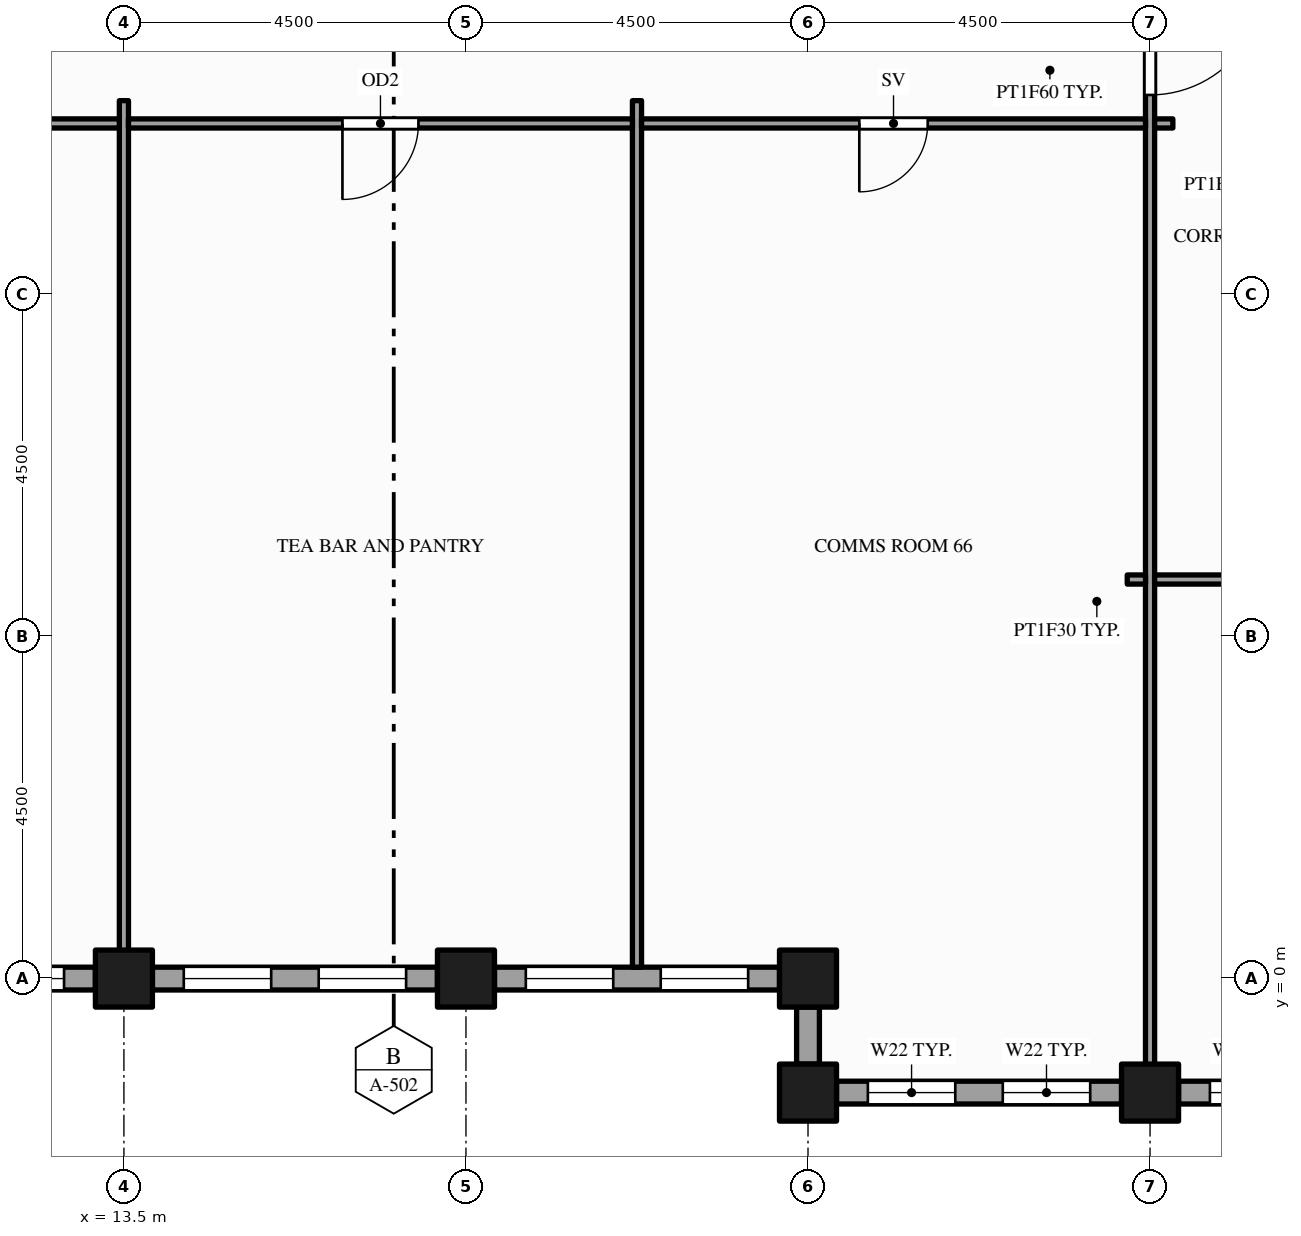
"""IFC4 building model, lengths in metres.
Left out: names, types, materials, properties, quantities, classifications, styles, units other than length and angle.
Written with IfcOpenShell. Run it as: python <this file> out.ifc"""

import sys

from ifc_helpers import new_model, si_unit, direction, frame, frame_2d, origin, origin_2d, place, context, subcontext, project, spatial, rectangle, hollow_rectangle, extrude, element, fill, save


model = new_model("IFC4")
c1 = context("Model", 3, precision=1e-05, world=origin(), true_north=direction((0.0, 1.0)))
c2 = subcontext(c1, "Body", "Model", "MODEL_VIEW")
j1 = project(units=[si_unit("LENGTHUNIT", "METRE"), si_unit("PLANEANGLEUNIT", "RADIAN")], contexts=[c1])
p1 = place(None, origin())
s1 = spatial("IfcSite", under=j1, at=p1, CompositionType="ELEMENT")
p2 = place(p1, origin())
s2 = spatial("IfcBuilding", under=s1, at=p2, CompositionType="ELEMENT")
p3 = place(p2, frame((0.0, 0.0, 207.0)))
s3 = spatial("IfcBuildingStorey", under=s2, at=p3, CompositionType="ELEMENT", Elevation=207.0)
for number, where, z_axis, x_axis in (
    (1, (13.5, 0.0, -0.15), (0.0, 0.0, 1.0), (1.0, 0.0, 0.0)),
    (2, (18.0, 0.0, -0.15), (0.0, 0.0, 1.0), (1.0, 0.0, 0.0)),
    (3, (22.5, -1.5, -0.15), (0.0, 0.0, 1.0), (1.0, 0.0, 0.0)),
    (4, (22.5, 0.0, -0.15), (0.0, 0.0, 1.0), (1.0, 0.0, 0.0)),
    (5, (27.0, -1.5, -0.15), (0.0, 0.0, 1.0), (1.0, 0.0, 0.0)),
):
    element("IfcColumn", number, at=place(p3, frame(where, z_axis=z_axis, x_axis=x_axis)), inside=s3, PredefinedType="COLUMN", context=c2, shape_type="SweptSolid", body=[
        extrude(hollow_rectangle(XDim=0.75, YDim=0.75, WallThickness=0.036, at=origin_2d()), origin(), (0.0, 0.0, 1.0), 4.0),
    ])
p4 = place(p3, frame((22.875, -1.5, 0.0), z_axis=(0.0, 0.0, 1.0), x_axis=(1.0, 0.0, 0.0)))
e6 = element("IfcWall", 6, at=p4, inside=s3, PredefinedType="STANDARD", context=c2, shape_type="SweptSolid", body=[
    extrude(rectangle(XDim=3.75, YDim=0.3, at=frame_2d((1.875, 0.0))), origin(), (0.0, 0.0, 1.0), 2.76),
])
p5 = place(p4, frame((0.413, 0.0, 0.9)))
e7 = element("IfcOpeningElement", 7, at=p5, cuts=e6, PredefinedType="OPENING", context=c2, shape_type="SweptSolid", body=[
    extrude(rectangle(XDim=1.15, YDim=1.5, at=frame_2d((0.575, 0.75))), frame((0.0, 0.16, 0.0), z_axis=(0.0, -1.0, 0.0), x_axis=(1.0, 0.0, 0.0)), (0.0, 0.0, 1.0), 0.32),
])
p6 = place(p4, frame((2.188, 0.0, 0.9)))
e8 = element("IfcOpeningElement", 8, at=p6, cuts=e6, PredefinedType="OPENING", context=c2, shape_type="SweptSolid", body=[
    extrude(rectangle(XDim=1.15, YDim=1.5, at=frame_2d((0.575, 0.75))), frame((0.0, 0.16, 0.0), z_axis=(0.0, -1.0, 0.0), x_axis=(1.0, 0.0, 0.0)), (0.0, 0.0, 1.0), 0.32),
])
p7 = place(p3, frame((27.375, -1.5, 0.0), z_axis=(0.0, 0.0, 1.0), x_axis=(1.0, 0.0, 0.0)))
e9 = element("IfcWall", 9, at=p7, inside=s3, PredefinedType="STANDARD", context=c2, shape_type="SweptSolid", body=[
    extrude(rectangle(XDim=3.75, YDim=0.3, at=frame_2d((1.875, 0.0))), origin(), (0.0, 0.0, 1.0), 2.87),
])
p8 = place(p7, frame((0.413, 0.0, 0.9)))
e10 = element("IfcOpeningElement", 10, at=p8, cuts=e9, PredefinedType="OPENING", context=c2, shape_type="SweptSolid", body=[
    extrude(rectangle(XDim=1.15, YDim=1.75, at=frame_2d((0.575, 0.875))), frame((0.0, 0.16, 0.0), z_axis=(0.0, -1.0, 0.0), x_axis=(1.0, 0.0, 0.0)), (0.0, 0.0, 1.0), 0.32),
])
p9 = place(p7, frame((2.188, 0.0, 0.9)))
e11 = element("IfcOpeningElement", 11, at=p9, cuts=e9, PredefinedType="OPENING", context=c2, shape_type="SweptSolid", body=[
    extrude(rectangle(XDim=1.15, YDim=1.75, at=frame_2d((0.575, 0.875))), frame((0.0, 0.16, 0.0), z_axis=(0.0, -1.0, 0.0), x_axis=(1.0, 0.0, 0.0)), (0.0, 0.0, 1.0), 0.32),
])
p10 = place(p3, frame((9.375, 0.0, 0.0), z_axis=(0.0, 0.0, 1.0), x_axis=(1.0, 0.0, 0.0)))
e12 = element("IfcWall", 12, at=p10, inside=s3, PredefinedType="STANDARD", context=c2, shape_type="SweptSolid", body=[
    extrude(rectangle(XDim=3.75, YDim=0.3, at=frame_2d((1.875, 0.0))), origin(), (0.0, 0.0, 1.0), 2.87),
])
p11 = place(p10, frame((0.413, 0.0, 0.9)))
e13 = element("IfcOpeningElement", 13, at=p11, cuts=e12, PredefinedType="OPENING", context=c2, shape_type="SweptSolid", body=[
    extrude(rectangle(XDim=1.15, YDim=1.75, at=frame_2d((0.575, 0.875))), frame((0.0, 0.16, 0.0), z_axis=(0.0, -1.0, 0.0), x_axis=(1.0, 0.0, 0.0)), (0.0, 0.0, 1.0), 0.32),
])
p12 = place(p10, frame((2.188, 0.0, 0.9)))
e14 = element("IfcOpeningElement", 14, at=p12, cuts=e12, PredefinedType="OPENING", context=c2, shape_type="SweptSolid", body=[
    extrude(rectangle(XDim=1.15, YDim=1.75, at=frame_2d((0.575, 0.875))), frame((0.0, 0.16, 0.0), z_axis=(0.0, -1.0, 0.0), x_axis=(1.0, 0.0, 0.0)), (0.0, 0.0, 1.0), 0.32),
])
p13 = place(p3, frame((13.875, 0.0, 0.0), z_axis=(0.0, 0.0, 1.0), x_axis=(1.0, 0.0, 0.0)))
e15 = element("IfcWall", 15, at=p13, inside=s3, PredefinedType="STANDARD", context=c2, shape_type="SweptSolid", body=[
    extrude(rectangle(XDim=3.75, YDim=0.3, at=frame_2d((1.875, 0.0))), origin(), (0.0, 0.0, 1.0), 2.87),
])
p14 = place(p13, frame((0.413, 0.0, 0.9)))
e16 = element("IfcOpeningElement", 16, at=p14, cuts=e15, PredefinedType="OPENING", context=c2, shape_type="SweptSolid", body=[
    extrude(rectangle(XDim=1.15, YDim=1.75, at=frame_2d((0.575, 0.875))), frame((0.0, 0.16, 0.0), z_axis=(0.0, -1.0, 0.0), x_axis=(1.0, 0.0, 0.0)), (0.0, 0.0, 1.0), 0.32),
])
p15 = place(p13, frame((2.188, 0.0, 0.9)))
e17 = element("IfcOpeningElement", 17, at=p15, cuts=e15, PredefinedType="OPENING", context=c2, shape_type="SweptSolid", body=[
    extrude(rectangle(XDim=1.15, YDim=1.75, at=frame_2d((0.575, 0.875))), frame((0.0, 0.16, 0.0), z_axis=(0.0, -1.0, 0.0), x_axis=(1.0, 0.0, 0.0)), (0.0, 0.0, 1.0), 0.32),
])
p16 = place(p3, frame((18.375, 0.0, 0.0), z_axis=(0.0, 0.0, 1.0), x_axis=(1.0, 0.0, 0.0)))
e18 = element("IfcWall", 18, at=p16, inside=s3, PredefinedType="STANDARD", context=c2, shape_type="SweptSolid", body=[
    extrude(rectangle(XDim=3.75, YDim=0.3, at=frame_2d((1.875, 0.0))), origin(), (0.0, 0.0, 1.0), 2.87),
])
p17 = place(p16, frame((0.413, 0.0, 0.9)))
e19 = element("IfcOpeningElement", 19, at=p17, cuts=e18, PredefinedType="OPENING", context=c2, shape_type="SweptSolid", body=[
    extrude(rectangle(XDim=1.15, YDim=1.75, at=frame_2d((0.575, 0.875))), frame((0.0, 0.16, 0.0), z_axis=(0.0, -1.0, 0.0), x_axis=(1.0, 0.0, 0.0)), (0.0, 0.0, 1.0), 0.32),
])
p18 = place(p16, frame((2.188, 0.0, 0.9)))
e20 = element("IfcOpeningElement", 20, at=p18, cuts=e18, PredefinedType="OPENING", context=c2, shape_type="SweptSolid", body=[
    extrude(rectangle(XDim=1.15, YDim=1.75, at=frame_2d((0.575, 0.875))), frame((0.0, 0.16, 0.0), z_axis=(0.0, -1.0, 0.0), x_axis=(1.0, 0.0, 0.0)), (0.0, 0.0, 1.0), 0.32),
])
p19 = place(p3, frame((22.5, -0.375, 0.0), z_axis=(0.0, 0.0, 1.0), x_axis=(0.0, -1.0, 0.0)))
e21 = element("IfcWall", 21, at=p19, inside=s3, PredefinedType="STANDARD", context=c2, shape_type="SweptSolid", body=[
    extrude(rectangle(XDim=0.75, YDim=0.3, at=frame_2d((0.375, 0.0))), origin(), (0.0, 0.0, 1.0), 3.157),
])
for number, where, z_axis, x_axis in (
    (22, (13.5, 0.15, 0.0), (0.0, 0.0, 1.0), (0.0, 1.0, 0.0)),
    (23, (20.25, 0.15, 0.0), (0.0, 0.0, 1.0), (0.0, 1.0, 0.0)),
):
    element("IfcWall", number, at=place(p3, frame(where, z_axis=z_axis, x_axis=x_axis)), inside=s3, PredefinedType="PARTITIONING", context=c2, shape_type="SweptSolid", body=[
        extrude(rectangle(XDim=11.4, YDim=0.12, at=frame_2d((5.7, 0.0))), origin(), (0.0, 0.0, 1.0), 2.87),
    ])
p20 = place(p3, frame((27.0, -1.35, 0.0), z_axis=(0.0, 0.0, 1.0), x_axis=(0.0, 1.0, 0.0)))
e24 = element("IfcWall", 24, at=p20, inside=s3, PredefinedType="PARTITIONING", context=c2, shape_type="SweptSolid", body=[
    extrude(rectangle(XDim=22.48, YDim=0.12, at=frame_2d((11.24, 0.0))), origin(), (0.0, 0.0, 1.0), 2.87),
])
p21 = place(p20, frame((12.975, 0.0, 0.0)))
e25 = element("IfcOpeningElement", 25, at=p21, cuts=e24, PredefinedType="OPENING", context=c2, shape_type="SweptSolid", body=[
    extrude(rectangle(XDim=1.5, YDim=2.1, at=frame_2d((0.75, 1.05))), frame((0.0, 0.07, 0.0), z_axis=(0.0, -1.0, 0.0), x_axis=(1.0, 0.0, 0.0)), (0.0, 0.0, 1.0), 0.14),
])
p22 = place(p3, frame((26.7, 5.25, 0.0), z_axis=(0.0, 0.0, 1.0), x_axis=(1.0, 0.0, 0.0)))
e26 = element("IfcWall", 26, at=p22, inside=s3, PredefinedType="PARTITIONING", context=c2, shape_type="SweptSolid", body=[
    extrude(rectangle(XDim=0.24, YDim=0.12, at=frame_2d((0.12, 0.0))), origin(), (0.0, 0.0, 1.0), 2.87),
])
p23 = place(p3, frame((27.06, 5.25, 0.0), z_axis=(0.0, 0.0, 1.0), x_axis=(1.0, 0.0, 0.0)))
e27 = element("IfcWall", 27, at=p23, inside=s3, PredefinedType="PARTITIONING", context=c2, shape_type="SweptSolid", body=[
    extrude(rectangle(XDim=2.13, YDim=0.12, at=frame_2d((1.065, 0.0))), origin(), (0.0, 0.0, 1.0), 2.87),
])
p24 = place(p3, frame((9.06, 11.25, 0.0), z_axis=(0.0, 0.0, 1.0), x_axis=(1.0, 0.0, 0.0)))
e28 = element("IfcWall", 28, at=p24, inside=s3, PredefinedType="PARTITIONING", context=c2, shape_type="SweptSolid", body=[
    extrude(rectangle(XDim=4.38, YDim=0.12, at=frame_2d((2.19, 0.0))), origin(), (0.0, 0.0, 1.0), 2.87),
])
p25 = place(p24, frame((1.69, 0.0, 0.0)))
e29 = element("IfcOpeningElement", 29, at=p25, cuts=e28, PredefinedType="OPENING", context=c2, shape_type="SweptSolid", body=[
    extrude(rectangle(XDim=1.0, YDim=2.1, at=frame_2d((0.5, 1.05))), frame((0.0, 0.07, 0.0), z_axis=(0.0, -1.0, 0.0), x_axis=(1.0, 0.0, 0.0)), (0.0, 0.0, 1.0), 0.14),
])
p26 = place(p3, frame((13.56, 11.25, 0.0), z_axis=(0.0, 0.0, 1.0), x_axis=(1.0, 0.0, 0.0)))
e30 = element("IfcWall", 30, at=p26, inside=s3, PredefinedType="PARTITIONING", context=c2, shape_type="SweptSolid", body=[
    extrude(rectangle(XDim=6.63, YDim=0.12, at=frame_2d((3.315, 0.0))), origin(), (0.0, 0.0, 1.0), 2.87),
])
p27 = place(p26, frame((2.815, 0.0, 0.0)))
e31 = element("IfcOpeningElement", 31, at=p27, cuts=e30, PredefinedType="OPENING", context=c2, shape_type="SweptSolid", body=[
    extrude(rectangle(XDim=1.0, YDim=2.1, at=frame_2d((0.5, 1.05))), frame((0.0, 0.07, 0.0), z_axis=(0.0, -1.0, 0.0), x_axis=(1.0, 0.0, 0.0)), (0.0, 0.0, 1.0), 0.14),
])
p28 = place(p3, frame((20.31, 11.25, 0.0), z_axis=(0.0, 0.0, 1.0), x_axis=(1.0, 0.0, 0.0)))
e32 = element("IfcWall", 32, at=p28, inside=s3, PredefinedType="PARTITIONING", context=c2, shape_type="SweptSolid", body=[
    extrude(rectangle(XDim=6.63, YDim=0.12, at=frame_2d((3.315, 0.0))), origin(), (0.0, 0.0, 1.0), 2.76),
])
p29 = place(p28, frame((2.865, 0.0, 0.0)))
e33 = element("IfcOpeningElement", 33, at=p29, cuts=e32, PredefinedType="OPENING", context=c2, shape_type="SweptSolid", body=[
    extrude(rectangle(XDim=0.9, YDim=2.1, at=frame_2d((0.45, 1.05))), frame((0.0, 0.07, 0.0), z_axis=(0.0, -1.0, 0.0), x_axis=(1.0, 0.0, 0.0)), (0.0, 0.0, 1.0), 0.14),
])
p30 = place(p3, frame((27.06, 11.25, 0.0), z_axis=(0.0, 0.0, 1.0), x_axis=(1.0, 0.0, 0.0)))
e34 = element("IfcWall", 34, at=p30, inside=s3, PredefinedType="PARTITIONING", context=c2, shape_type="SweptSolid", body=[
    extrude(rectangle(XDim=0.24, YDim=0.12, at=frame_2d((0.12, 0.0))), origin(), (0.0, 0.0, 1.0), 2.87),
])
p31 = place(p5, origin())
e35 = element("IfcWindow", 35, at=p31, inside=s3, PartitioningType="SINGLE_PANEL", PredefinedType="WINDOW", context=c2, shape_type="SweptSolid", body=[
    extrude(rectangle(XDim=1.15, YDim=1.5, at=frame_2d((0.575, 0.75))), frame((0.0, 0.03, 0.0), z_axis=(0.0, -1.0, 0.0), x_axis=(1.0, 0.0, 0.0)), (0.0, 0.0, 1.0), 0.06),
])
fill(e7, e35)
p32 = place(p6, origin())
e36 = element("IfcWindow", 36, at=p32, inside=s3, PartitioningType="SINGLE_PANEL", PredefinedType="WINDOW", context=c2, shape_type="SweptSolid", body=[
    extrude(rectangle(XDim=1.15, YDim=1.5, at=frame_2d((0.575, 0.75))), frame((0.0, 0.03, 0.0), z_axis=(0.0, -1.0, 0.0), x_axis=(1.0, 0.0, 0.0)), (0.0, 0.0, 1.0), 0.06),
])
fill(e8, e36)
p33 = place(p8, origin())
e37 = element("IfcWindow", 37, at=p33, inside=s3, PartitioningType="SINGLE_PANEL", PredefinedType="WINDOW", context=c2, shape_type="SweptSolid", body=[
    extrude(rectangle(XDim=1.15, YDim=1.75, at=frame_2d((0.575, 0.875))), frame((0.0, 0.03, 0.0), z_axis=(0.0, -1.0, 0.0), x_axis=(1.0, 0.0, 0.0)), (0.0, 0.0, 1.0), 0.06),
])
fill(e10, e37)
p34 = place(p12, origin())
e38 = element("IfcWindow", 38, at=p34, inside=s3, PartitioningType="SINGLE_PANEL", PredefinedType="WINDOW", context=c2, shape_type="SweptSolid", body=[
    extrude(rectangle(XDim=1.15, YDim=1.75, at=frame_2d((0.575, 0.875))), frame((0.0, 0.03, 0.0), z_axis=(0.0, -1.0, 0.0), x_axis=(1.0, 0.0, 0.0)), (0.0, 0.0, 1.0), 0.06),
])
fill(e14, e38)
p35 = place(p14, origin())
e39 = element("IfcWindow", 39, at=p35, inside=s3, PartitioningType="SINGLE_PANEL", PredefinedType="WINDOW", context=c2, shape_type="SweptSolid", body=[
    extrude(rectangle(XDim=1.15, YDim=1.75, at=frame_2d((0.575, 0.875))), frame((0.0, 0.03, 0.0), z_axis=(0.0, -1.0, 0.0), x_axis=(1.0, 0.0, 0.0)), (0.0, 0.0, 1.0), 0.06),
])
fill(e16, e39)
p36 = place(p15, origin())
e40 = element("IfcWindow", 40, at=p36, inside=s3, PartitioningType="SINGLE_PANEL", PredefinedType="WINDOW", context=c2, shape_type="SweptSolid", body=[
    extrude(rectangle(XDim=1.15, YDim=1.75, at=frame_2d((0.575, 0.875))), frame((0.0, 0.03, 0.0), z_axis=(0.0, -1.0, 0.0), x_axis=(1.0, 0.0, 0.0)), (0.0, 0.0, 1.0), 0.06),
])
fill(e17, e40)
p37 = place(p17, origin())
e41 = element("IfcWindow", 41, at=p37, inside=s3, PartitioningType="SINGLE_PANEL", PredefinedType="WINDOW", context=c2, shape_type="SweptSolid", body=[
    extrude(rectangle(XDim=1.15, YDim=1.75, at=frame_2d((0.575, 0.875))), frame((0.0, 0.03, 0.0), z_axis=(0.0, -1.0, 0.0), x_axis=(1.0, 0.0, 0.0)), (0.0, 0.0, 1.0), 0.06),
])
fill(e19, e41)
p38 = place(p18, origin())
e42 = element("IfcWindow", 42, at=p38, inside=s3, PartitioningType="SINGLE_PANEL", PredefinedType="WINDOW", context=c2, shape_type="SweptSolid", body=[
    extrude(rectangle(XDim=1.15, YDim=1.75, at=frame_2d((0.575, 0.875))), frame((0.0, 0.03, 0.0), z_axis=(0.0, -1.0, 0.0), x_axis=(1.0, 0.0, 0.0)), (0.0, 0.0, 1.0), 0.06),
])
fill(e20, e42)
p39 = place(p21, origin())
e43 = element("IfcDoor", 43, at=p39, inside=s3, OperationType="SINGLE_SWING_RIGHT", PredefinedType="DOOR", context=c2, shape_type="SweptSolid", body=[
    extrude(rectangle(XDim=1.5, YDim=2.1, at=frame_2d((0.75, 1.05))), frame((0.0, 0.025, 0.0), z_axis=(0.0, -1.0, 0.0), x_axis=(1.0, 0.0, 0.0)), (0.0, 0.0, 1.0), 0.05),
])
fill(e25, e43)
p40 = place(p27, origin())
e44 = element("IfcDoor", 44, at=p40, inside=s3, OperationType="SINGLE_SWING_LEFT", PredefinedType="DOOR", context=c2, shape_type="SweptSolid", body=[
    extrude(rectangle(XDim=1.0, YDim=2.1, at=frame_2d((0.5, 1.05))), frame((0.0, 0.025, 0.0), z_axis=(0.0, -1.0, 0.0), x_axis=(1.0, 0.0, 0.0)), (0.0, 0.0, 1.0), 0.05),
])
fill(e31, e44)
p41 = place(p29, origin())
e45 = element("IfcDoor", 45, at=p41, inside=s3, OperationType="SINGLE_SWING_LEFT", PredefinedType="DOOR", context=c2, shape_type="SweptSolid", body=[
    extrude(rectangle(XDim=0.9, YDim=2.1, at=frame_2d((0.45, 1.05))), frame((0.0, 0.025, 0.0), z_axis=(0.0, -1.0, 0.0), x_axis=(1.0, 0.0, 0.0)), (0.0, 0.0, 1.0), 0.05),
])
fill(e33, e45)
save(model, sys.argv[1])
